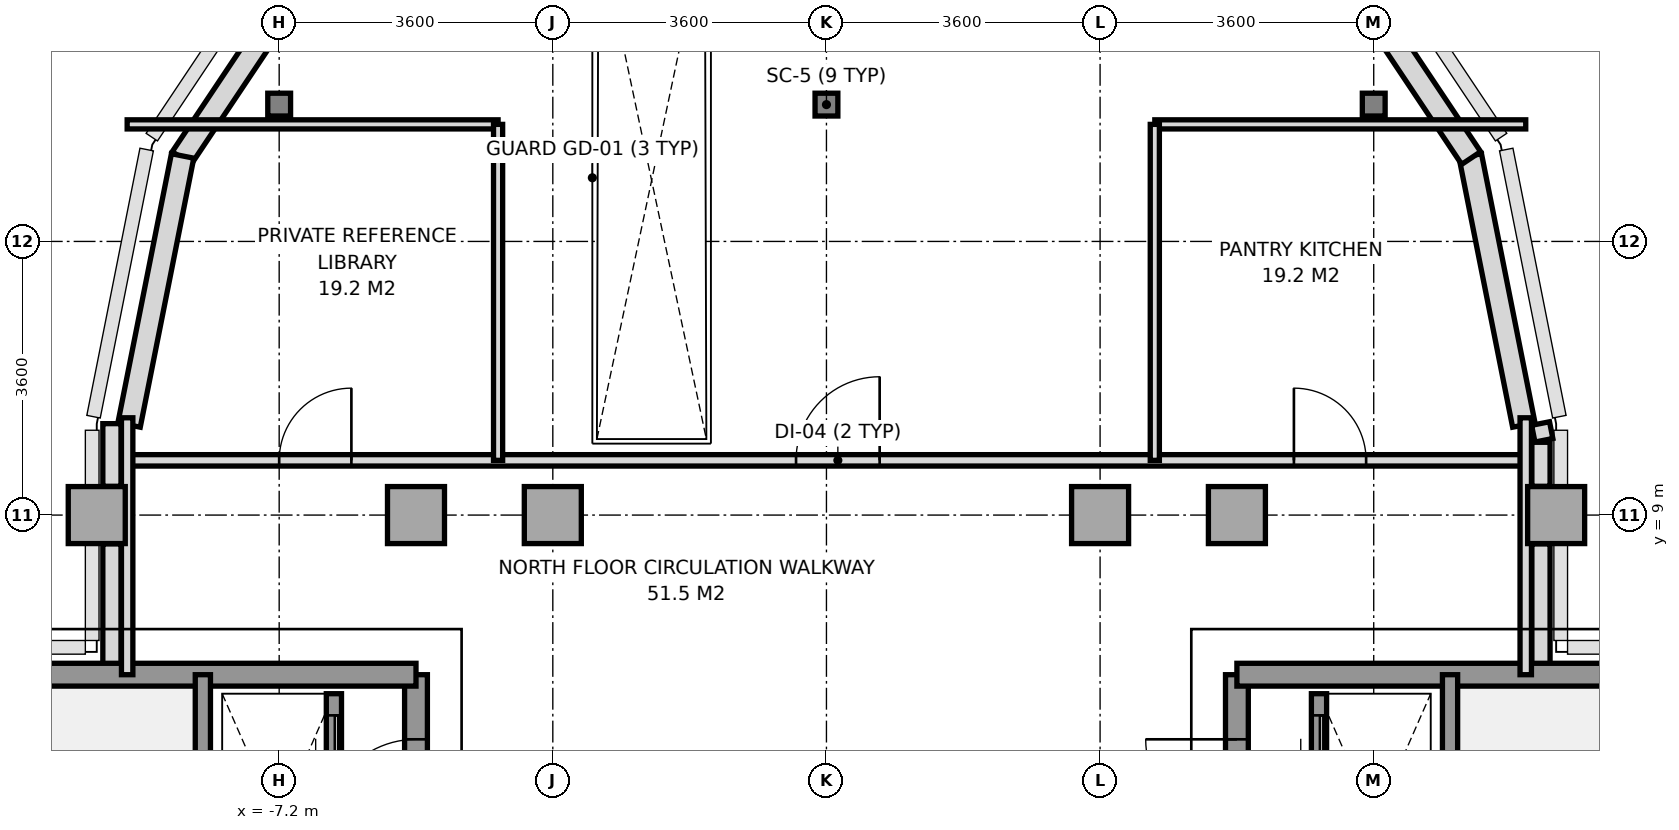
"""IFC4 building model, lengths in metres.
Left out: names, types, materials, properties, quantities, classifications, styles, units other than length and angle.
Written with IfcOpenShell. Run it as: python <this file> out.ifc"""

import sys

from ifc_helpers import new_model, si_unit, direction, frame, frame_2d, origin, origin_2d, place, context, subcontext, project, spatial, rectangle, i_section, extrude, source, transform, mapped, element, fill, save


model = new_model("IFC4")
c1 = context("Model", 3, precision=1e-05, world=origin(), true_north=direction((0.0, 1.0)))
c2 = subcontext(c1, "Body", "Model", "MODEL_VIEW")
j1 = project(units=[si_unit("LENGTHUNIT", "METRE"), si_unit("PLANEANGLEUNIT", "RADIAN")], contexts=[c1])
p1 = place(None, origin())
s1 = spatial("IfcSite", under=j1, at=p1, CompositionType="ELEMENT")
p2 = place(p1, origin())
s2 = spatial("IfcBuilding", under=s1, at=p2, CompositionType="ELEMENT")
p3 = place(p2, frame((0.0, 0.0, 223.6)))
s3 = spatial("IfcBuildingStorey", under=s2, at=p3, CompositionType="ELEMENT", Elevation=223.6)
m1 = source(origin(), c2, "Body", "SweptSolid", [
    extrude(rectangle(XDim=0.75, YDim=0.75, at=origin_2d()), origin(), (0.0, 0.0, 1.0), 3.01),
])
p4 = place(p3, frame((-9.6, 9.0, 0.0), z_axis=(0.0, 0.0, 1.0), x_axis=(1.0, 0.0, 0.0)))
e1 = element("IfcColumn", 1, at=p4, inside=s3, PredefinedType="COLUMN", context=c2, shape_type="MappedRepresentation", body=[
    mapped(m1, transform((0.0, 0.0, 0.0), x_axis=(1.0, 0.0, 0.0), y_axis=(0.0, 1.0, 0.0), z_axis=(0.0, 0.0, 1.0), scale=1.0)),
])
m2 = source(origin(), c2, "Body", "SweptSolid", [
    extrude(i_section(OverallWidth=0.3, OverallDepth=0.3, WebThickness=0.011, FlangeThickness=0.019, at=origin_2d()), origin(), (0.0, 0.0, 1.0), 3.01),
])
p5 = place(p3, frame((-7.2, 14.4, 0.0), z_axis=(0.0, 0.0, 1.0), x_axis=(1.0, 0.0, 0.0)))
e2 = element("IfcColumn", 2, at=p5, inside=s3, PredefinedType="COLUMN", context=c2, shape_type="MappedRepresentation", body=[
    mapped(m2, transform((0.0, 0.0, 0.0), x_axis=(1.0, 0.0, 0.0), y_axis=(0.0, 1.0, 0.0), z_axis=(0.0, 0.0, 1.0), scale=1.0)),
])
for number, where, z_axis, x_axis in (
    (3, (-5.4, 9.0, 0.0), (0.0, 0.0, 1.0), (1.0, 0.0, 0.0)),
    (4, (-3.6, 9.0, 0.0), (0.0, 0.0, 1.0), (1.0, 0.0, 0.0)),
):
    element("IfcColumn", number, at=place(p3, frame(where, z_axis=z_axis, x_axis=x_axis)), inside=s3, PredefinedType="COLUMN", context=c2, shape_type="MappedRepresentation", body=[
        mapped(m1, transform((0.0, 0.0, 0.0), x_axis=(1.0, 0.0, 0.0), y_axis=(0.0, 1.0, 0.0), z_axis=(0.0, 0.0, 1.0), scale=1.0)),
    ])
p6 = place(p3, frame((0.0, 14.4, 0.0), z_axis=(0.0, 0.0, 1.0), x_axis=(1.0, 0.0, 0.0)))
e5 = element("IfcColumn", 5, at=p6, inside=s3, PredefinedType="COLUMN", context=c2, shape_type="MappedRepresentation", body=[
    mapped(m2, transform((0.0, 0.0, 0.0), x_axis=(1.0, 0.0, 0.0), y_axis=(0.0, 1.0, 0.0), z_axis=(0.0, 0.0, 1.0), scale=1.0)),
])
for number, where, z_axis, x_axis in (
    (6, (3.6, 9.0, 0.0), (0.0, 0.0, 1.0), (1.0, 0.0, 0.0)),
    (7, (5.4, 9.0, 0.0), (0.0, 0.0, 1.0), (1.0, 0.0, 0.0)),
):
    element("IfcColumn", number, at=place(p3, frame(where, z_axis=z_axis, x_axis=x_axis)), inside=s3, PredefinedType="COLUMN", context=c2, shape_type="MappedRepresentation", body=[
        mapped(m1, transform((0.0, 0.0, 0.0), x_axis=(1.0, 0.0, 0.0), y_axis=(0.0, 1.0, 0.0), z_axis=(0.0, 0.0, 1.0), scale=1.0)),
    ])
p7 = place(p3, frame((7.2, 14.4, 0.0), z_axis=(0.0, 0.0, 1.0), x_axis=(1.0, 0.0, 0.0)))
e8 = element("IfcColumn", 8, at=p7, inside=s3, PredefinedType="COLUMN", context=c2, shape_type="MappedRepresentation", body=[
    mapped(m2, transform((0.0, 0.0, 0.0), x_axis=(1.0, 0.0, 0.0), y_axis=(0.0, 1.0, 0.0), z_axis=(0.0, 0.0, 1.0), scale=1.0)),
])
p8 = place(p3, frame((9.6, 9.0, 0.0), z_axis=(0.0, 0.0, 1.0), x_axis=(1.0, 0.0, 0.0)))
e9 = element("IfcColumn", 9, at=p8, inside=s3, PredefinedType="COLUMN", context=c2, shape_type="MappedRepresentation", body=[
    mapped(m1, transform((0.0, 0.0, 0.0), x_axis=(1.0, 0.0, 0.0), y_axis=(0.0, 1.0, 0.0), z_axis=(0.0, 0.0, 1.0), scale=1.0)),
])
p9 = place(p3, frame((9.175, 10.185, 0.0), z_axis=(0.0, 0.0, 1.0), x_axis=(-0.195114232679, 0.980780523974, 0.0)))
e10 = element("IfcWall", 10, at=p9, inside=s3, PredefinedType="SOLIDWALL", context=c2, shape_type="SweptSolid", body=[
    extrude(rectangle(XDim=3.609, YDim=0.3, at=frame_2d((1.804, 0.0))), origin(), (0.0, 0.0, 1.0), 3.01),
])
for number, where, z_axis, x_axis in (
    (11, (8.482, 13.698, 0.0), (0.0, 0.0, 1.0), (-0.556, 0.831, 0.0)),
    (12, (-7.305, 15.458, 0.0), (0.0, 0.0, 1.0), (-0.556, -0.831, 0.0)),
):
    element("IfcWall", number, at=place(p3, frame(where, z_axis=z_axis, x_axis=x_axis)), inside=s3, PredefinedType="SOLIDWALL", context=c2, shape_type="SweptSolid", body=[
        extrude(rectangle(XDim=2.118, YDim=0.3, at=frame_2d((1.059, 0.0))), origin(), (0.0, 0.0, 1.0), 2.61),
    ])
p10 = place(p3, frame((-8.471, 13.725, 0.0), z_axis=(0.0, 0.0, 1.0), x_axis=(-0.195114232679, -0.980780523974, 0.0)))
e13 = element("IfcWall", 13, at=p10, inside=s3, PredefinedType="SOLIDWALL", context=c2, shape_type="SweptSolid", body=[
    extrude(rectangle(XDim=3.609, YDim=0.3, at=frame_2d((1.804, 0.0))), origin(), (0.0, 0.0, 1.0), 3.01),
])
p11 = place(p3, frame((-9.4, 6.953, 0.0), z_axis=(0.0, 0.0, 1.0), x_axis=(0.0, 1.0, 0.0)))
e14 = element("IfcWall", 14, at=p11, inside=s3, PredefinedType="PARAPET", context=c2, shape_type="SweptSolid", body=[
    extrude(rectangle(XDim=1.669, YDim=0.24, at=frame_2d((0.834, 0.0))), origin(), (0.0, 0.0, 1.0), 1.15),
])
p12 = place(p3, frame((-9.4, 9.378, 0.0), z_axis=(0.0, 0.0, 1.0), x_axis=(0.0, 1.0, 0.0)))
e15 = element("IfcWall", 15, at=p12, inside=s3, PredefinedType="PARAPET", context=c2, shape_type="SweptSolid", body=[
    extrude(rectangle(XDim=0.825, YDim=0.24, at=frame_2d((0.413, 0.0))), origin(), (0.0, 0.0, 1.0), 1.15),
])
p13 = place(p3, frame((9.395, 10.204, 0.0), z_axis=(0.0, 0.0, 1.0), x_axis=(0.194859894132, -0.980831087221, 0.0)))
e16 = element("IfcWall", 16, at=p13, inside=s3, PredefinedType="PARAPET", context=c2, shape_type="SweptSolid", body=[
    extrude(rectangle(XDim=0.224, YDim=0.24, at=frame_2d((0.112, 0.0))), origin(), (0.0, 0.0, 1.0), 1.15),
])
p14 = place(p3, frame((9.4, 9.958, 0.0), z_axis=(0.0, 0.0, 1.0), x_axis=(0.0, -1.0, 0.0)))
e17 = element("IfcWall", 17, at=p14, inside=s3, PredefinedType="PARAPET", context=c2, shape_type="SweptSolid", body=[
    extrude(rectangle(XDim=0.58, YDim=0.24, at=frame_2d((0.29, 0.0))), origin(), (0.0, 0.0, 1.0), 1.15),
])
p15 = place(p3, frame((9.4, 8.622, 0.0), z_axis=(0.0, 0.0, 1.0), x_axis=(0.0, -1.0, 0.0)))
e18 = element("IfcWall", 18, at=p15, inside=s3, PredefinedType="PARAPET", context=c2, shape_type="SweptSolid", body=[
    extrude(rectangle(XDim=1.669, YDim=0.24, at=frame_2d((0.834, 0.0))), origin(), (0.0, 0.0, 1.0), 1.15),
])
p16 = place(p3, frame((-5.4, -5.6, 0.0), z_axis=(0.0, 0.0, 1.0), x_axis=(0.0, 1.0, 0.0)))
e19 = element("IfcWall", 19, at=p16, inside=s3, PredefinedType="SHEAR", context=c2, shape_type="SweptSolid", body=[
    extrude(rectangle(XDim=12.5, YDim=0.3, at=frame_2d((6.25, 0.0))), origin(), (0.0, 0.0, 1.0), 3.01),
])
p17 = place(p16, frame((4.55, 0.0, 0.0)))
e20 = element("IfcOpeningElement", 20, at=p17, cuts=e19, PredefinedType="OPENING", context=c2, shape_type="SweptSolid", body=[
    extrude(rectangle(XDim=1.2, YDim=2.2, at=frame_2d((0.6, 1.1))), frame((0.0, 0.16, 0.0), z_axis=(0.0, -1.0, 0.0), x_axis=(1.0, 0.0, 0.0)), (0.0, 0.0, 1.0), 0.32),
])
p18 = place(p16, frame((10.45, 0.0, 0.0)))
e21 = element("IfcOpeningElement", 21, at=p18, cuts=e19, PredefinedType="OPENING", context=c2, shape_type="SweptSolid", body=[
    extrude(rectangle(XDim=1.2, YDim=2.2, at=frame_2d((0.6, 1.1))), frame((0.0, 0.16, 0.0), z_axis=(0.0, -1.0, 0.0), x_axis=(1.0, 0.0, 0.0)), (0.0, 0.0, 1.0), 0.32),
])
p19 = place(p16, frame((6.86, 0.0, 0.0)))
e22 = element("IfcOpeningElement", 22, at=p19, cuts=e19, PredefinedType="OPENING", context=c2, shape_type="SweptSolid", body=[
    extrude(rectangle(XDim=0.8, YDim=2.1, at=frame_2d((0.4, 1.05))), frame((0.0, 0.16, 0.0), z_axis=(0.0, -1.0, 0.0), x_axis=(1.0, 0.0, 0.0)), (0.0, 0.0, 1.0), 0.32),
])
p20 = place(p3, frame((-11.356, 6.9, 0.0), z_axis=(0.0, 0.0, 1.0), x_axis=(1.0, 0.0, 0.0)))
e23 = element("IfcWall", 23, at=p20, inside=s3, PredefinedType="SHEAR", context=c2, shape_type="SweptSolid", body=[
    extrude(rectangle(XDim=5.956, YDim=0.3, at=frame_2d((2.978, 0.0))), origin(), (0.0, 0.0, 1.0), 3.01),
])
p21 = place(p3, frame((-8.204, -0.016, 0.0), z_axis=(0.0, 0.0, 1.0), x_axis=(0.0, 1.0, 0.0)))
e24 = element("IfcWall", 24, at=p21, inside=s3, PredefinedType="SOLIDWALL", context=c2, shape_type="SweptSolid", body=[
    extrude(rectangle(XDim=6.916, YDim=0.2, at=frame_2d((3.458, 0.0))), origin(), (0.0, 0.0, 1.0), 3.01),
])
p22 = place(p21, frame((0.2, 0.0, 0.0)))
e25 = element("IfcOpeningElement", 25, at=p22, cuts=e24, PredefinedType="OPENING", context=c2, shape_type="SweptSolid", body=[
    extrude(rectangle(XDim=1.2, YDim=2.2, at=frame_2d((0.6, 1.1))), frame((0.0, 0.11, 0.0), z_axis=(0.0, -1.0, 0.0), x_axis=(1.0, 0.0, 0.0)), (0.0, 0.0, 1.0), 0.22),
])
p23 = place(p3, frame((5.4, -5.6, 0.0), z_axis=(0.0, 0.0, 1.0), x_axis=(0.0, 1.0, 0.0)))
e26 = element("IfcWall", 26, at=p23, inside=s3, PredefinedType="SHEAR", context=c2, shape_type="SweptSolid", body=[
    extrude(rectangle(XDim=12.5, YDim=0.3, at=frame_2d((6.25, 0.0))), origin(), (0.0, 0.0, 1.0), 3.01),
])
p24 = place(p23, frame((4.55, 0.0, 0.0)))
e27 = element("IfcOpeningElement", 27, at=p24, cuts=e26, PredefinedType="OPENING", context=c2, shape_type="SweptSolid", body=[
    extrude(rectangle(XDim=1.2, YDim=2.2, at=frame_2d((0.6, 1.1))), frame((0.0, 0.16, 0.0), z_axis=(0.0, -1.0, 0.0), x_axis=(1.0, 0.0, 0.0)), (0.0, 0.0, 1.0), 0.32),
])
p25 = place(p23, frame((10.45, 0.0, 0.0)))
e28 = element("IfcOpeningElement", 28, at=p25, cuts=e26, PredefinedType="OPENING", context=c2, shape_type="SweptSolid", body=[
    extrude(rectangle(XDim=1.2, YDim=2.2, at=frame_2d((0.6, 1.1))), frame((0.0, 0.16, 0.0), z_axis=(0.0, -1.0, 0.0), x_axis=(1.0, 0.0, 0.0)), (0.0, 0.0, 1.0), 0.32),
])
p26 = place(p23, frame((6.86, 0.0, 0.0)))
e29 = element("IfcOpeningElement", 29, at=p26, cuts=e26, PredefinedType="OPENING", context=c2, shape_type="SweptSolid", body=[
    extrude(rectangle(XDim=0.8, YDim=2.1, at=frame_2d((0.4, 1.05))), frame((0.0, 0.16, 0.0), z_axis=(0.0, -1.0, 0.0), x_axis=(1.0, 0.0, 0.0)), (0.0, 0.0, 1.0), 0.32),
])
p27 = place(p23, frame((7.88, 0.0, 0.0)))
e30 = element("IfcOpeningElement", 30, at=p27, cuts=e26, PredefinedType="OPENING", context=c2, shape_type="SweptSolid", body=[
    extrude(rectangle(XDim=0.8, YDim=2.1, at=frame_2d((0.4, 1.05))), frame((0.0, 0.16, 0.0), z_axis=(0.0, -1.0, 0.0), x_axis=(1.0, 0.0, 0.0)), (0.0, 0.0, 1.0), 0.32),
])
p28 = place(p3, frame((5.4, 6.9, 0.0), z_axis=(0.0, 0.0, 1.0), x_axis=(1.0, 0.0, 0.0)))
e31 = element("IfcWall", 31, at=p28, inside=s3, PredefinedType="SHEAR", context=c2, shape_type="SweptSolid", body=[
    extrude(rectangle(XDim=5.956, YDim=0.3, at=frame_2d((2.978, 0.0))), origin(), (0.0, 0.0, 1.0), 3.01),
])
p29 = place(p3, frame((8.204, -0.016, 0.0), z_axis=(0.0, 0.0, 1.0), x_axis=(0.0, 1.0, 0.0)))
e32 = element("IfcWall", 32, at=p29, inside=s3, PredefinedType="SOLIDWALL", context=c2, shape_type="SweptSolid", body=[
    extrude(rectangle(XDim=6.916, YDim=0.2, at=frame_2d((3.458, 0.0))), origin(), (0.0, 0.0, 1.0), 3.01),
])
p30 = place(p29, frame((0.2, 0.0, 0.0)))
e33 = element("IfcOpeningElement", 33, at=p30, cuts=e32, PredefinedType="OPENING", context=c2, shape_type="SweptSolid", body=[
    extrude(rectangle(XDim=1.2, YDim=2.2, at=frame_2d((0.6, 1.1))), frame((0.0, 0.11, 0.0), z_axis=(0.0, -1.0, 0.0), x_axis=(1.0, 0.0, 0.0)), (0.0, 0.0, 1.0), 0.22),
])
p31 = place(p3, frame((-6.48, 4.98, 0.0), z_axis=(0.0, 0.0, 1.0), x_axis=(0.0, 1.0, 0.0)))
e34 = element("IfcWall", 34, at=p31, inside=s3, PredefinedType="SOLIDWALL", context=c2, shape_type="SweptSolid", body=[
    extrude(rectangle(XDim=1.67, YDim=0.2, at=frame_2d((0.835, 0.0))), origin(), (0.0, 0.0, 1.0), 3.01),
])
p32 = place(p31, frame((0.285, 0.0, 0.0)))
e35 = element("IfcOpeningElement", 35, at=p32, cuts=e34, PredefinedType="OPENING", context=c2, shape_type="SweptSolid", body=[
    extrude(rectangle(XDim=1.1, YDim=2.2, at=frame_2d((0.55, 1.1))), frame((0.0, 0.11, 0.0), z_axis=(0.0, -1.0, 0.0), x_axis=(1.0, 0.0, 0.0)), (0.0, 0.0, 1.0), 0.22),
])
p33 = place(p3, frame((6.48, 4.98, 0.0), z_axis=(0.0, 0.0, 1.0), x_axis=(0.0, 1.0, 0.0)))
e36 = element("IfcWall", 36, at=p33, inside=s3, PredefinedType="SOLIDWALL", context=c2, shape_type="SweptSolid", body=[
    extrude(rectangle(XDim=1.67, YDim=0.2, at=frame_2d((0.835, 0.0))), origin(), (0.0, 0.0, 1.0), 3.01),
])
p34 = place(p33, frame((0.285, 0.0, 0.0)))
e37 = element("IfcOpeningElement", 37, at=p34, cuts=e36, PredefinedType="OPENING", context=c2, shape_type="SweptSolid", body=[
    extrude(rectangle(XDim=1.1, YDim=2.2, at=frame_2d((0.55, 1.1))), frame((0.0, 0.11, 0.0), z_axis=(0.0, -1.0, 0.0), x_axis=(1.0, 0.0, 0.0)), (0.0, 0.0, 1.0), 0.22),
])
p35 = place(p3, frame((-9.2, 9.72, 0.0), z_axis=(0.0, 0.0, 1.0), x_axis=(1.0, 0.0, 0.0)))
e38 = element("IfcWall", 38, at=p35, inside=s3, PredefinedType="PARTITIONING", context=c2, shape_type="SweptSolid", body=[
    extrude(rectangle(XDim=18.4, YDim=0.15, at=frame_2d((9.2, 0.0))), origin(), (0.0, 0.0, 1.0), 3.01),
])
p36 = place(p35, frame((2.0, 0.0, 0.0)))
e39 = element("IfcOpeningElement", 39, at=p36, cuts=e38, PredefinedType="OPENING", context=c2, shape_type="SweptSolid", body=[
    extrude(rectangle(XDim=0.95, YDim=2.15, at=frame_2d((0.475, 1.075))), frame((0.0, 0.085, 0.0), z_axis=(0.0, -1.0, 0.0), x_axis=(1.0, 0.0, 0.0)), (0.0, 0.0, 1.0), 0.17),
])
p37 = place(p35, frame((15.35, 0.0, 0.0)))
e40 = element("IfcOpeningElement", 40, at=p37, cuts=e38, PredefinedType="OPENING", context=c2, shape_type="SweptSolid", body=[
    extrude(rectangle(XDim=0.95, YDim=2.15, at=frame_2d((0.475, 1.075))), frame((0.0, 0.085, 0.0), z_axis=(0.0, -1.0, 0.0), x_axis=(1.0, 0.0, 0.0)), (0.0, 0.0, 1.0), 0.17),
])
p38 = place(p35, frame((8.8, 0.0, 0.0)))
e41 = element("IfcOpeningElement", 41, at=p38, cuts=e38, PredefinedType="OPENING", context=c2, shape_type="SweptSolid", body=[
    extrude(rectangle(XDim=1.1, YDim=2.2, at=frame_2d((0.55, 1.1))), frame((0.0, 0.085, 0.0), z_axis=(0.0, -1.0, 0.0), x_axis=(1.0, 0.0, 0.0)), (0.0, 0.0, 1.0), 0.17),
])
for number, where, z_axis, x_axis in (
    (42, (-9.2, 6.9, 0.0), (0.0, 0.0, 1.0), (0.0, 1.0, 0.0)),
    (43, (9.2, 6.9, 0.0), (0.0, 0.0, 1.0), (0.0, 1.0, 0.0)),
):
    element("IfcWall", number, at=place(p3, frame(where, z_axis=z_axis, x_axis=x_axis)), inside=s3, PredefinedType="PARTITIONING", context=c2, shape_type="SweptSolid", body=[
        extrude(rectangle(XDim=3.38, YDim=0.15, at=frame_2d((1.69, 0.0))), origin(), (0.0, 0.0, 1.0), 2.61),
    ])
for number, where, z_axis, x_axis in (
    (44, (-9.2, 14.14, 0.0), (0.0, 0.0, 1.0), (1.0, 0.0, 0.0)),
    (45, (4.32, 14.14, 0.0), (0.0, 0.0, 1.0), (1.0, 0.0, 0.0)),
):
    element("IfcWall", number, at=place(p3, frame(where, z_axis=z_axis, x_axis=x_axis)), inside=s3, PredefinedType="PARTITIONING", context=c2, shape_type="SweptSolid", body=[
        extrude(rectangle(XDim=4.88, YDim=0.12, at=frame_2d((2.44, 0.0))), origin(), (0.0, 0.0, 1.0), 3.01),
    ])
for number, where, z_axis, x_axis in (
    (46, (-4.32, 9.72, 0.0), (0.0, 0.0, 1.0), (0.0, 1.0, 0.0)),
    (47, (4.32, 9.72, 0.0), (0.0, 0.0, 1.0), (0.0, 1.0, 0.0)),
):
    element("IfcWall", number, at=place(p3, frame(where, z_axis=z_axis, x_axis=x_axis)), inside=s3, PredefinedType="PARTITIONING", context=c2, shape_type="SweptSolid", body=[
        extrude(rectangle(XDim=4.42, YDim=0.12, at=frame_2d((2.21, 0.0))), origin(), (0.0, 0.0, 1.0), 3.01),
    ])
m3 = source(origin(), c2, "Body", "SweptSolid", [
    extrude(rectangle(XDim=1.2, YDim=2.2, at=frame_2d((0.6, 1.1))), frame((0.0, 0.025, 0.0), z_axis=(0.0, -1.0, 0.0), x_axis=(1.0, 0.0, 0.0)), (0.0, 0.0, 1.0), 0.05),
])
p39 = place(p18, origin())
e48 = element("IfcDoor", 48, at=p39, inside=s3, OperationType="SINGLE_SWING_LEFT", PredefinedType="DOOR", context=c2, shape_type="MappedRepresentation", body=[
    mapped(m3, transform((0.0, 0.0, 0.0), x_axis=(1.0, 0.0, 0.0), y_axis=(0.0, 1.0, 0.0), z_axis=(0.0, 0.0, 1.0), scale=1.0)),
])
fill(e21, e48)
p40 = place(p25, origin())
e49 = element("IfcDoor", 49, at=p40, inside=s3, OperationType="SINGLE_SWING_RIGHT", PredefinedType="DOOR", context=c2, shape_type="MappedRepresentation", body=[
    mapped(m3, transform((0.0, 0.0, 0.0), x_axis=(1.0, 0.0, 0.0), y_axis=(0.0, 1.0, 0.0), z_axis=(0.0, 0.0, 1.0), scale=1.0)),
])
fill(e28, e49)
m4 = source(origin(), c2, "Body", "SweptSolid", [
    extrude(rectangle(XDim=1.1, YDim=2.2, at=frame_2d((0.55, 1.1))), frame((0.0, 0.025, 0.0), z_axis=(0.0, -1.0, 0.0), x_axis=(1.0, 0.0, 0.0)), (0.0, 0.0, 1.0), 0.05),
])
p41 = place(p32, origin())
e50 = element("IfcDoor", 50, at=p41, inside=s3, OperationType="SLIDING_TO_LEFT", PredefinedType="DOOR", context=c2, shape_type="MappedRepresentation", body=[
    mapped(m4, transform((0.0, 0.0, 0.0), x_axis=(1.0, 0.0, 0.0), y_axis=(0.0, 1.0, 0.0), z_axis=(0.0, 0.0, 1.0), scale=1.0)),
])
fill(e35, e50)
p42 = place(p34, origin())
e51 = element("IfcDoor", 51, at=p42, inside=s3, OperationType="SLIDING_TO_LEFT", PredefinedType="DOOR", context=c2, shape_type="MappedRepresentation", body=[
    mapped(m4, transform((0.0, 0.0, 0.0), x_axis=(1.0, 0.0, 0.0), y_axis=(0.0, 1.0, 0.0), z_axis=(0.0, 0.0, 1.0), scale=1.0)),
])
fill(e37, e51)
m5 = source(origin(), c2, "Body", "SweptSolid", [
    extrude(rectangle(XDim=0.95, YDim=2.15, at=frame_2d((0.475, 1.075))), frame((0.0, 0.025, 0.0), z_axis=(0.0, -1.0, 0.0), x_axis=(1.0, 0.0, 0.0)), (0.0, 0.0, 1.0), 0.05),
])
p43 = place(p36, origin())
e52 = element("IfcDoor", 52, at=p43, inside=s3, OperationType="SINGLE_SWING_RIGHT", PredefinedType="DOOR", context=c2, shape_type="MappedRepresentation", body=[
    mapped(m5, transform((0.0, 0.0, 0.0), x_axis=(1.0, 0.0, 0.0), y_axis=(0.0, 1.0, 0.0), z_axis=(0.0, 0.0, 1.0), scale=1.0)),
])
fill(e39, e52)
p44 = place(p37, origin())
e53 = element("IfcDoor", 53, at=p44, inside=s3, OperationType="SINGLE_SWING_LEFT", PredefinedType="DOOR", context=c2, shape_type="MappedRepresentation", body=[
    mapped(m5, transform((0.0, 0.0, 0.0), x_axis=(1.0, 0.0, 0.0), y_axis=(0.0, 1.0, 0.0), z_axis=(0.0, 0.0, 1.0), scale=1.0)),
])
fill(e40, e53)
p45 = place(p38, origin())
e54 = element("IfcDoor", 54, at=p45, inside=s3, OperationType="SINGLE_SWING_RIGHT", PredefinedType="DOOR", context=c2, shape_type="MappedRepresentation", body=[
    mapped(m4, transform((0.0, 0.0, 0.0), x_axis=(1.0, 0.0, 0.0), y_axis=(0.0, 1.0, 0.0), z_axis=(0.0, 0.0, 1.0), scale=1.0)),
])
fill(e41, e54)
save(model, sys.argv[1])
